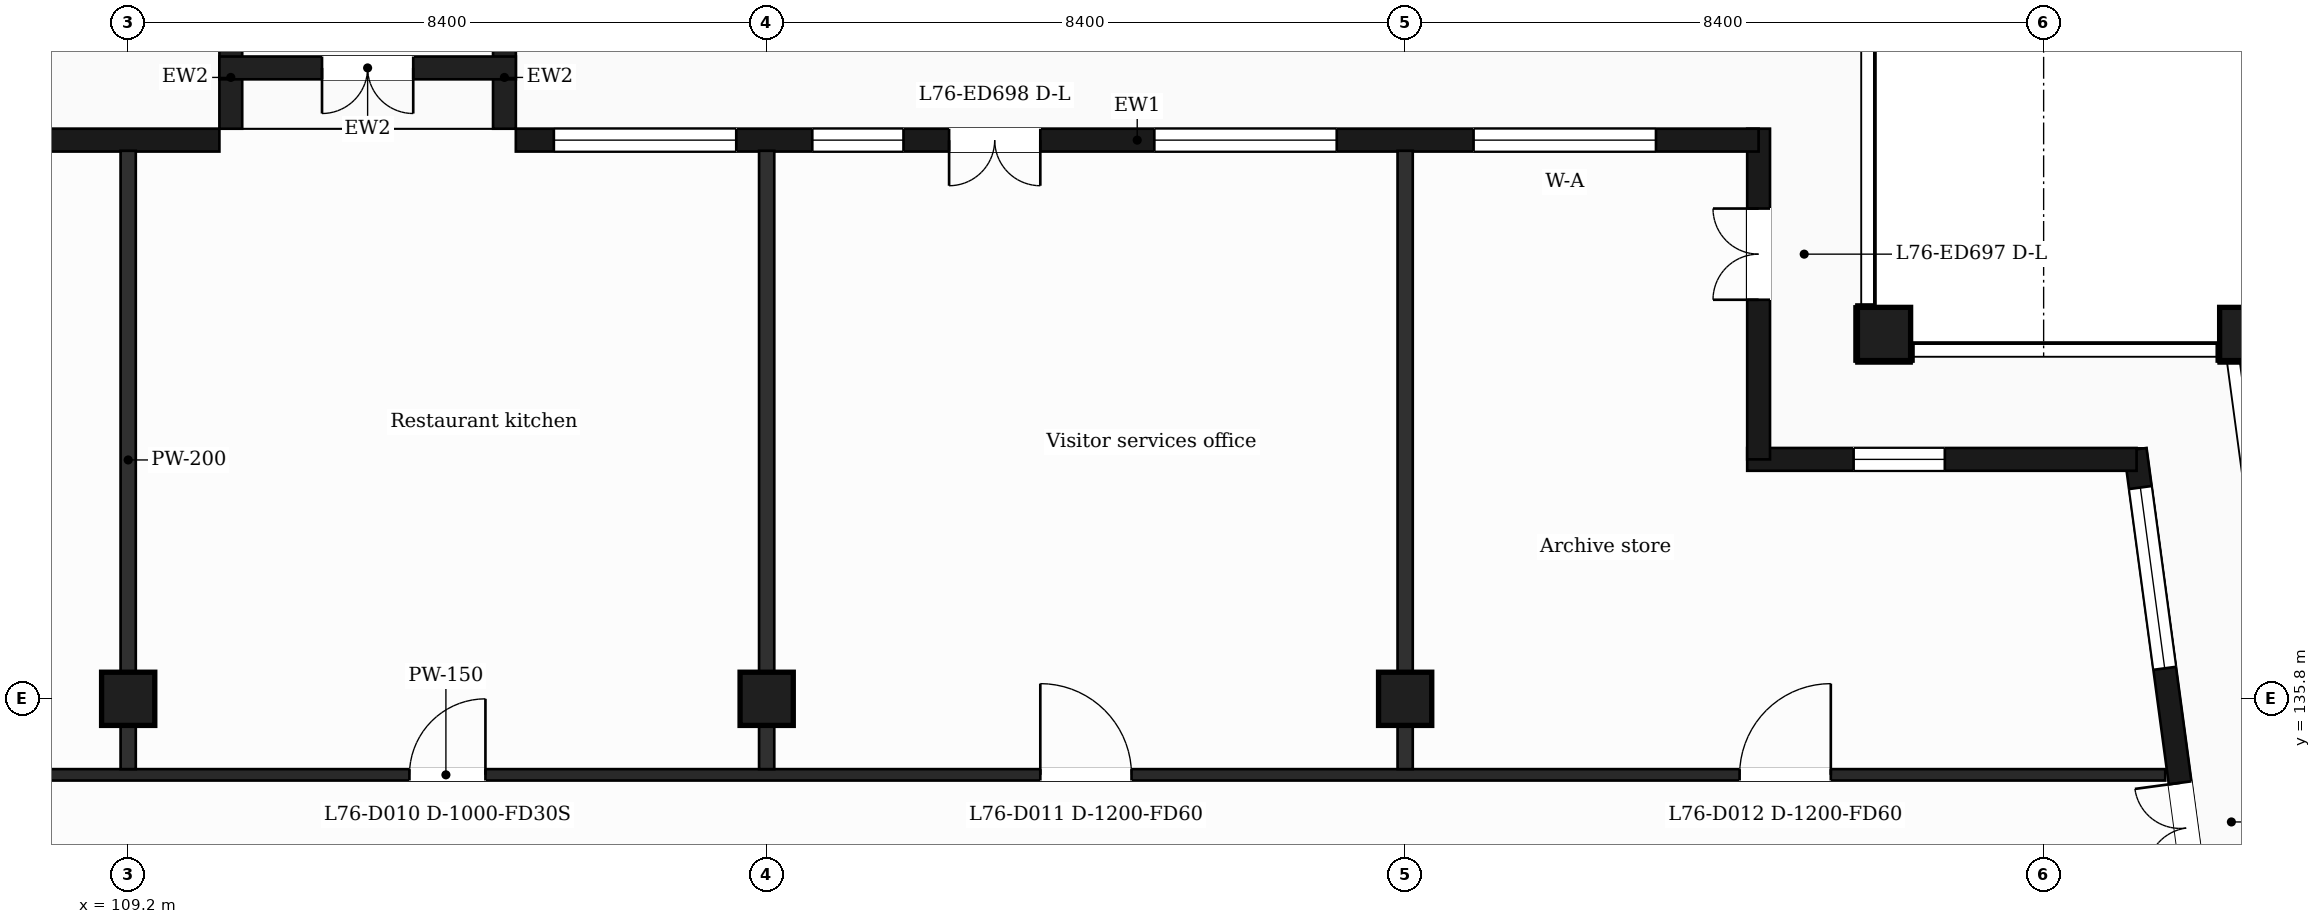
"""IFC4 building model, lengths in metres.
Left out: names, types, materials, properties, quantities, classifications, styles, units other than length and angle.
Written with IfcOpenShell. Run it as: python <this file> out.ifc"""

import sys

from ifc_helpers import new_model, si_unit, direction, frame, frame_2d, origin, origin_2d, place, context, subcontext, project, spatial, rectangle, extrude, element, fill, save


model = new_model("IFC4")
c1 = context("Model", 3, precision=1e-05, world=origin(), true_north=direction((0.0, 1.0)))
c2 = subcontext(c1, "Body", "Model", "MODEL_VIEW")
j1 = project(units=[si_unit("LENGTHUNIT", "METRE"), si_unit("PLANEANGLEUNIT", "RADIAN")], contexts=[c1])
p1 = place(None, origin())
s1 = spatial("IfcSite", under=j1, at=p1, CompositionType="ELEMENT")
p2 = place(p1, origin())
s2 = spatial("IfcBuilding", under=s1, at=p2, CompositionType="ELEMENT")
p3 = place(p2, frame((0.0, 0.0, 315.4)))
s3 = spatial("IfcBuildingStorey", under=s2, at=p3, CompositionType="ELEMENT", Elevation=315.4)
for number, where, z_axis, x_axis in (
    (1, (132.3, 140.6, 0.0), (0.0, 0.0, 1.0), (1.0, 0.0, 0.0)),
    (2, (137.065, 140.6, 0.0), (0.0, 0.0, 1.0), (1.0, 0.0, 0.0)),
    (3, (109.2, 135.8, 0.0), (0.0, 0.0, 1.0), (1.0, 0.0, 0.0)),
    (4, (117.6, 135.8, 0.0), (0.0, 0.0, 1.0), (1.0, 0.0, 0.0)),
    (5, (126.0, 135.8, 0.0), (0.0, 0.0, 1.0), (1.0, 0.0, 0.0)),
):
    element("IfcColumn", number, at=place(p3, frame(where, z_axis=z_axis, x_axis=x_axis)), inside=s3, PredefinedType="COLUMN", context=c2, shape_type="SweptSolid", body=[
        extrude(rectangle(XDim=0.7, YDim=0.7, at=origin_2d()), origin(), (0.0, 0.0, 1.0), 4.5),
    ])
p4 = place(p3, frame((136.504, 132.4, 0.0), z_axis=(0.0, 0.0, 1.0), x_axis=(-0.133399697462, 0.99106231929, 0.0)))
e6 = element("IfcWall", 6, at=p4, inside=s3, PredefinedType="SOLIDWALL", context=c2, shape_type="SweptSolid", body=[
    extrude(rectangle(XDim=6.74, YDim=0.3, at=frame_2d((3.37, 0.0))), origin(), (0.0, 0.0, 1.0), 4.05),
])
p5 = place(p4, frame((1.115, 0.0, 0.0)))
e7 = element("IfcOpeningElement", 7, at=p5, cuts=e6, PredefinedType="OPENING", context=c2, shape_type="SweptSolid", body=[
    extrude(rectangle(XDim=1.2, YDim=2.4, at=frame_2d((0.6, 1.2))), frame((0.0, 0.16, 0.0), z_axis=(0.0, -1.0, 0.0), x_axis=(1.0, 0.0, 0.0)), (0.0, 0.0, 1.0), 0.32),
])
p6 = place(p4, frame((3.835, 0.0, 0.9)))
e8 = element("IfcOpeningElement", 8, at=p6, cuts=e6, PredefinedType="OPENING", context=c2, shape_type="SweptSolid", body=[
    extrude(rectangle(XDim=2.4, YDim=2.1, at=frame_2d((1.2, 1.05))), frame((0.0, 0.16, 0.0), z_axis=(0.0, -1.0, 0.0), x_axis=(1.0, 0.0, 0.0)), (0.0, 0.0, 1.0), 0.32),
])
p7 = place(p3, frame((135.623, 138.95, 0.0), z_axis=(0.0, 0.0, 1.0), x_axis=(-1.0, 0.0, 0.0)))
e9 = element("IfcWall", 9, at=p7, inside=s3, PredefinedType="SOLIDWALL", context=c2, shape_type="SweptSolid", body=[
    extrude(rectangle(XDim=5.123, YDim=0.3, at=frame_2d((2.561, 0.0))), origin(), (0.0, 0.0, 1.0), 4.05),
])
p8 = place(p7, frame((2.523, 0.0, 0.9)))
e10 = element("IfcOpeningElement", 10, at=p8, cuts=e9, PredefinedType="OPENING", context=c2, shape_type="SweptSolid", body=[
    extrude(rectangle(XDim=1.2, YDim=2.1, at=frame_2d((0.6, 1.05))), frame((0.0, 0.16, 0.0), z_axis=(0.0, -1.0, 0.0), x_axis=(1.0, 0.0, 0.0)), (0.0, 0.0, 1.0), 0.32),
])
p9 = place(p3, frame((130.65, 138.95, 0.0), z_axis=(0.0, 0.0, 1.0), x_axis=(0.0, 1.0, 0.0)))
e11 = element("IfcWall", 11, at=p9, inside=s3, PredefinedType="SOLIDWALL", context=c2, shape_type="SweptSolid", body=[
    extrude(rectangle(XDim=4.35, YDim=0.3, at=frame_2d((2.175, 0.0))), origin(), (0.0, 0.0, 1.0), 4.05),
])
p10 = place(p9, frame((2.1, 0.0, 0.0)))
e12 = element("IfcOpeningElement", 12, at=p10, cuts=e11, PredefinedType="OPENING", context=c2, shape_type="SweptSolid", body=[
    extrude(rectangle(XDim=1.2, YDim=2.4, at=frame_2d((0.6, 1.2))), frame((0.0, 0.16, 0.0), z_axis=(0.0, -1.0, 0.0), x_axis=(1.0, 0.0, 0.0)), (0.0, 0.0, 1.0), 0.32),
])
p11 = place(p3, frame((130.65, 143.15, 0.0), z_axis=(0.0, 0.0, 1.0), x_axis=(-1.0, 0.0, 0.0)))
e13 = element("IfcWall", 13, at=p11, inside=s3, PredefinedType="SOLIDWALL", context=c2, shape_type="SweptSolid", body=[
    extrude(rectangle(XDim=16.35, YDim=0.3, at=frame_2d((8.175, 0.0))), origin(), (0.0, 0.0, 1.0), 4.05),
])
p12 = place(p11, frame((1.35, 0.0, 0.9)))
e14 = element("IfcOpeningElement", 14, at=p12, cuts=e13, PredefinedType="OPENING", context=c2, shape_type="SweptSolid", body=[
    extrude(rectangle(XDim=2.4, YDim=2.1, at=frame_2d((1.2, 1.05))), frame((0.0, 0.16, 0.0), z_axis=(0.0, -1.0, 0.0), x_axis=(1.0, 0.0, 0.0)), (0.0, 0.0, 1.0), 0.32),
])
p13 = place(p11, frame((5.55, 0.0, 0.9)))
e15 = element("IfcOpeningElement", 15, at=p13, cuts=e13, PredefinedType="OPENING", context=c2, shape_type="SweptSolid", body=[
    extrude(rectangle(XDim=2.4, YDim=2.1, at=frame_2d((1.2, 1.05))), frame((0.0, 0.16, 0.0), z_axis=(0.0, -1.0, 0.0), x_axis=(1.0, 0.0, 0.0)), (0.0, 0.0, 1.0), 0.32),
])
p14 = place(p11, frame((9.45, 0.0, 0.0)))
e16 = element("IfcOpeningElement", 16, at=p14, cuts=e13, PredefinedType="OPENING", context=c2, shape_type="SweptSolid", body=[
    extrude(rectangle(XDim=1.2, YDim=2.4, at=frame_2d((0.6, 1.2))), frame((0.0, 0.16, 0.0), z_axis=(0.0, -1.0, 0.0), x_axis=(1.0, 0.0, 0.0)), (0.0, 0.0, 1.0), 0.32),
])
p15 = place(p11, frame((11.25, 0.0, 0.9)))
e17 = element("IfcOpeningElement", 17, at=p15, cuts=e13, PredefinedType="OPENING", context=c2, shape_type="SweptSolid", body=[
    extrude(rectangle(XDim=1.2, YDim=2.1, at=frame_2d((0.6, 1.05))), frame((0.0, 0.16, 0.0), z_axis=(0.0, -1.0, 0.0), x_axis=(1.0, 0.0, 0.0)), (0.0, 0.0, 1.0), 0.32),
])
p16 = place(p11, frame((13.45, 0.0, 0.9)))
e18 = element("IfcOpeningElement", 18, at=p16, cuts=e13, PredefinedType="OPENING", context=c2, shape_type="SweptSolid", body=[
    extrude(rectangle(XDim=2.4, YDim=2.1, at=frame_2d((1.2, 1.05))), frame((0.0, 0.16, 0.0), z_axis=(0.0, -1.0, 0.0), x_axis=(1.0, 0.0, 0.0)), (0.0, 0.0, 1.0), 0.32),
])
p17 = place(p3, frame((110.4, 143.15, 0.0), z_axis=(0.0, 0.0, 1.0), x_axis=(-1.0, 0.0, 0.0)))
e19 = element("IfcWall", 19, at=p17, inside=s3, PredefinedType="SOLIDWALL", context=c2, shape_type="SweptSolid", body=[
    extrude(rectangle(XDim=14.4, YDim=0.3, at=frame_2d((7.2, 0.0))), origin(), (0.0, 0.0, 1.0), 4.05),
])
p18 = place(p17, frame((2.7, 0.0, 0.9)))
e20 = element("IfcOpeningElement", 20, at=p18, cuts=e19, PredefinedType="OPENING", context=c2, shape_type="SweptSolid", body=[
    extrude(rectangle(XDim=1.2, YDim=2.1, at=frame_2d((0.6, 1.05))), frame((0.0, 0.16, 0.0), z_axis=(0.0, -1.0, 0.0), x_axis=(1.0, 0.0, 0.0)), (0.0, 0.0, 1.0), 0.32),
])
p19 = place(p17, frame((6.9, 0.0, 0.0)))
e21 = element("IfcOpeningElement", 21, at=p19, cuts=e19, PredefinedType="OPENING", context=c2, shape_type="SweptSolid", body=[
    extrude(rectangle(XDim=1.2, YDim=2.4, at=frame_2d((0.6, 1.2))), frame((0.0, 0.16, 0.0), z_axis=(0.0, -1.0, 0.0), x_axis=(1.0, 0.0, 0.0)), (0.0, 0.0, 1.0), 0.32),
])
p20 = place(p17, frame((10.5, 0.0, 0.9)))
e22 = element("IfcOpeningElement", 22, at=p20, cuts=e19, PredefinedType="OPENING", context=c2, shape_type="SweptSolid", body=[
    extrude(rectangle(XDim=2.4, YDim=2.1, at=frame_2d((1.2, 1.05))), frame((0.0, 0.16, 0.0), z_axis=(0.0, -1.0, 0.0), x_axis=(1.0, 0.0, 0.0)), (0.0, 0.0, 1.0), 0.32),
])
for number, where, z_axis, x_axis in (
    (23, (114.15, 143.3, 0.0), (0.0, 0.0, 1.0), (0.0, 1.0, 0.0)),
    (24, (110.55, 143.3, 0.0), (0.0, 0.0, 1.0), (0.0, 1.0, 0.0)),
):
    element("IfcWall", number, at=place(p3, frame(where, z_axis=z_axis, x_axis=x_axis)), inside=s3, PredefinedType="SOLIDWALL", context=c2, shape_type="SweptSolid", body=[
        extrude(rectangle(XDim=1.35, YDim=0.3, at=frame_2d((0.675, 0.0))), origin(), (0.0, 0.0, 1.0), 4.05),
    ])
p21 = place(p3, frame((114.3, 144.1, 0.0), z_axis=(0.0, 0.0, 1.0), x_axis=(-1.0, 0.0, 0.0)))
e25 = element("IfcWall", 25, at=p21, inside=s3, PredefinedType="SOLIDWALL", context=c2, shape_type="SweptSolid", body=[
    extrude(rectangle(XDim=3.9, YDim=0.3, at=frame_2d((1.95, 0.0))), origin(), (0.0, 0.0, 1.0), 4.05),
])
p22 = place(p21, frame((1.35, 0.0, 0.0)))
e26 = element("IfcOpeningElement", 26, at=p22, cuts=e25, PredefinedType="OPENING", context=c2, shape_type="SweptSolid", body=[
    extrude(rectangle(XDim=1.2, YDim=2.4, at=frame_2d((0.6, 1.2))), frame((0.0, 0.16, 0.0), z_axis=(0.0, -1.0, 0.0), x_axis=(1.0, 0.0, 0.0)), (0.0, 0.0, 1.0), 0.32),
])
p23 = place(p3, frame((90.76, 134.8, 0.0), z_axis=(0.0, 0.0, 1.0), x_axis=(1.0, 0.0, 0.0)))
e27 = element("IfcWall", 27, at=p23, inside=s3, PredefinedType="PARTITIONING", context=c2, shape_type="SweptSolid", body=[
    extrude(rectangle(XDim=45.24, YDim=0.15, at=frame_2d((22.62, 0.0))), origin(), (0.0, 0.0, 1.0), 4.05),
])
p24 = place(p23, frame((7.632, 0.0, 0.0)))
e28 = element("IfcOpeningElement", 28, at=p24, cuts=e27, PredefinedType="OPENING", context=c2, shape_type="SweptSolid", body=[
    extrude(rectangle(XDim=1.2, YDim=2.1, at=frame_2d((0.6, 1.05))), frame((0.0, 0.085, 0.0), z_axis=(0.0, -1.0, 0.0), x_axis=(1.0, 0.0, 0.0)), (0.0, 0.0, 1.0), 0.17),
])
p25 = place(p23, frame((22.14, 0.0, 0.0)))
e29 = element("IfcOpeningElement", 29, at=p25, cuts=e27, PredefinedType="OPENING", context=c2, shape_type="SweptSolid", body=[
    extrude(rectangle(XDim=1.0, YDim=2.1, at=frame_2d((0.5, 1.05))), frame((0.0, 0.085, 0.0), z_axis=(0.0, -1.0, 0.0), x_axis=(1.0, 0.0, 0.0)), (0.0, 0.0, 1.0), 0.17),
])
p26 = place(p23, frame((30.44, 0.0, 0.0)))
e30 = element("IfcOpeningElement", 30, at=p26, cuts=e27, PredefinedType="OPENING", context=c2, shape_type="SweptSolid", body=[
    extrude(rectangle(XDim=1.2, YDim=2.1, at=frame_2d((0.6, 1.05))), frame((0.0, 0.085, 0.0), z_axis=(0.0, -1.0, 0.0), x_axis=(1.0, 0.0, 0.0)), (0.0, 0.0, 1.0), 0.17),
])
p27 = place(p23, frame((39.64, 0.0, 0.0)))
e31 = element("IfcOpeningElement", 31, at=p27, cuts=e27, PredefinedType="OPENING", context=c2, shape_type="SweptSolid", body=[
    extrude(rectangle(XDim=1.2, YDim=2.1, at=frame_2d((0.6, 1.05))), frame((0.0, 0.085, 0.0), z_axis=(0.0, -1.0, 0.0), x_axis=(1.0, 0.0, 0.0)), (0.0, 0.0, 1.0), 0.17),
])
for number, where, z_axis, x_axis in (
    (32, (109.2, 134.875, 0.0), (0.0, 0.0, 1.0), (0.0, 1.0, 0.0)),
    (33, (117.6, 134.875, 0.0), (0.0, 0.0, 1.0), (0.0, 1.0, 0.0)),
    (34, (126.0, 134.875, 0.0), (0.0, 0.0, 1.0), (0.0, 1.0, 0.0)),
):
    element("IfcWall", number, at=place(p3, frame(where, z_axis=z_axis, x_axis=x_axis)), inside=s3, PredefinedType="PARTITIONING", context=c2, shape_type="SweptSolid", body=[
        extrude(rectangle(XDim=8.135, YDim=0.2, at=frame_2d((4.067, 0.0))), origin(), (0.0, 0.0, 1.0), 4.05),
    ])
p28 = place(p5, origin())
e35 = element("IfcDoor", 35, at=p28, inside=s3, OperationType="DOUBLE_DOOR_SINGLE_SWING", PredefinedType="DOOR", context=c2, shape_type="SweptSolid", body=[
    extrude(rectangle(XDim=1.2, YDim=2.4, at=frame_2d((0.6, 1.2))), frame((0.0, 0.025, 0.0), z_axis=(0.0, -1.0, 0.0), x_axis=(1.0, 0.0, 0.0)), (0.0, 0.0, 1.0), 0.05),
])
fill(e7, e35)
p29 = place(p6, origin())
e36 = element("IfcWindow", 36, at=p29, inside=s3, PartitioningType="SINGLE_PANEL", PredefinedType="WINDOW", context=c2, shape_type="SweptSolid", body=[
    extrude(rectangle(XDim=2.4, YDim=2.1, at=frame_2d((1.2, 1.05))), frame((0.0, 0.03, 0.0), z_axis=(0.0, -1.0, 0.0), x_axis=(1.0, 0.0, 0.0)), (0.0, 0.0, 1.0), 0.06),
])
fill(e8, e36)
p30 = place(p8, origin())
e37 = element("IfcWindow", 37, at=p30, inside=s3, PartitioningType="SINGLE_PANEL", PredefinedType="WINDOW", context=c2, shape_type="SweptSolid", body=[
    extrude(rectangle(XDim=1.2, YDim=2.1, at=frame_2d((0.6, 1.05))), frame((0.0, 0.03, 0.0), z_axis=(0.0, -1.0, 0.0), x_axis=(1.0, 0.0, 0.0)), (0.0, 0.0, 1.0), 0.06),
])
fill(e10, e37)
p31 = place(p10, origin())
e38 = element("IfcDoor", 38, at=p31, inside=s3, OperationType="DOUBLE_DOOR_SINGLE_SWING", PredefinedType="DOOR", context=c2, shape_type="SweptSolid", body=[
    extrude(rectangle(XDim=1.2, YDim=2.4, at=frame_2d((0.6, 1.2))), frame((0.0, 0.025, 0.0), z_axis=(0.0, -1.0, 0.0), x_axis=(1.0, 0.0, 0.0)), (0.0, 0.0, 1.0), 0.05),
])
fill(e12, e38)
p32 = place(p12, origin())
e39 = element("IfcWindow", 39, at=p32, inside=s3, PartitioningType="SINGLE_PANEL", PredefinedType="WINDOW", context=c2, shape_type="SweptSolid", body=[
    extrude(rectangle(XDim=2.4, YDim=2.1, at=frame_2d((1.2, 1.05))), frame((0.0, 0.03, 0.0), z_axis=(0.0, -1.0, 0.0), x_axis=(1.0, 0.0, 0.0)), (0.0, 0.0, 1.0), 0.06),
])
fill(e14, e39)
p33 = place(p13, origin())
e40 = element("IfcWindow", 40, at=p33, inside=s3, PartitioningType="SINGLE_PANEL", PredefinedType="WINDOW", context=c2, shape_type="SweptSolid", body=[
    extrude(rectangle(XDim=2.4, YDim=2.1, at=frame_2d((1.2, 1.05))), frame((0.0, 0.03, 0.0), z_axis=(0.0, -1.0, 0.0), x_axis=(1.0, 0.0, 0.0)), (0.0, 0.0, 1.0), 0.06),
])
fill(e15, e40)
p34 = place(p14, origin())
e41 = element("IfcDoor", 41, at=p34, inside=s3, OperationType="DOUBLE_DOOR_SINGLE_SWING", PredefinedType="DOOR", context=c2, shape_type="SweptSolid", body=[
    extrude(rectangle(XDim=1.2, YDim=2.4, at=frame_2d((0.6, 1.2))), frame((0.0, 0.025, 0.0), z_axis=(0.0, -1.0, 0.0), x_axis=(1.0, 0.0, 0.0)), (0.0, 0.0, 1.0), 0.05),
])
fill(e16, e41)
p35 = place(p15, origin())
e42 = element("IfcWindow", 42, at=p35, inside=s3, PartitioningType="SINGLE_PANEL", PredefinedType="WINDOW", context=c2, shape_type="SweptSolid", body=[
    extrude(rectangle(XDim=1.2, YDim=2.1, at=frame_2d((0.6, 1.05))), frame((0.0, 0.03, 0.0), z_axis=(0.0, -1.0, 0.0), x_axis=(1.0, 0.0, 0.0)), (0.0, 0.0, 1.0), 0.06),
])
fill(e17, e42)
p36 = place(p16, origin())
e43 = element("IfcWindow", 43, at=p36, inside=s3, PartitioningType="SINGLE_PANEL", PredefinedType="WINDOW", context=c2, shape_type="SweptSolid", body=[
    extrude(rectangle(XDim=2.4, YDim=2.1, at=frame_2d((1.2, 1.05))), frame((0.0, 0.03, 0.0), z_axis=(0.0, -1.0, 0.0), x_axis=(1.0, 0.0, 0.0)), (0.0, 0.0, 1.0), 0.06),
])
fill(e18, e43)
p37 = place(p22, origin())
e44 = element("IfcDoor", 44, at=p37, inside=s3, OperationType="DOUBLE_DOOR_SINGLE_SWING", PredefinedType="DOOR", context=c2, shape_type="SweptSolid", body=[
    extrude(rectangle(XDim=1.2, YDim=2.4, at=frame_2d((0.6, 1.2))), frame((0.0, 0.025, 0.0), z_axis=(0.0, -1.0, 0.0), x_axis=(1.0, 0.0, 0.0)), (0.0, 0.0, 1.0), 0.05),
])
fill(e26, e44)
p38 = place(p25, origin())
e45 = element("IfcDoor", 45, at=p38, inside=s3, OperationType="SINGLE_SWING_RIGHT", PredefinedType="DOOR", context=c2, shape_type="SweptSolid", body=[
    extrude(rectangle(XDim=1.0, YDim=2.1, at=frame_2d((0.5, 1.05))), frame((0.0, 0.025, 0.0), z_axis=(0.0, -1.0, 0.0), x_axis=(1.0, 0.0, 0.0)), (0.0, 0.0, 1.0), 0.05),
])
fill(e29, e45)
p39 = place(p26, origin())
e46 = element("IfcDoor", 46, at=p39, inside=s3, OperationType="SINGLE_SWING_LEFT", PredefinedType="DOOR", context=c2, shape_type="SweptSolid", body=[
    extrude(rectangle(XDim=1.2, YDim=2.1, at=frame_2d((0.6, 1.05))), frame((0.0, 0.025, 0.0), z_axis=(0.0, -1.0, 0.0), x_axis=(1.0, 0.0, 0.0)), (0.0, 0.0, 1.0), 0.05),
])
fill(e30, e46)
p40 = place(p27, origin())
e47 = element("IfcDoor", 47, at=p40, inside=s3, OperationType="SINGLE_SWING_RIGHT", PredefinedType="DOOR", context=c2, shape_type="SweptSolid", body=[
    extrude(rectangle(XDim=1.2, YDim=2.1, at=frame_2d((0.6, 1.05))), frame((0.0, 0.025, 0.0), z_axis=(0.0, -1.0, 0.0), x_axis=(1.0, 0.0, 0.0)), (0.0, 0.0, 1.0), 0.05),
])
fill(e31, e47)
save(model, sys.argv[1])
